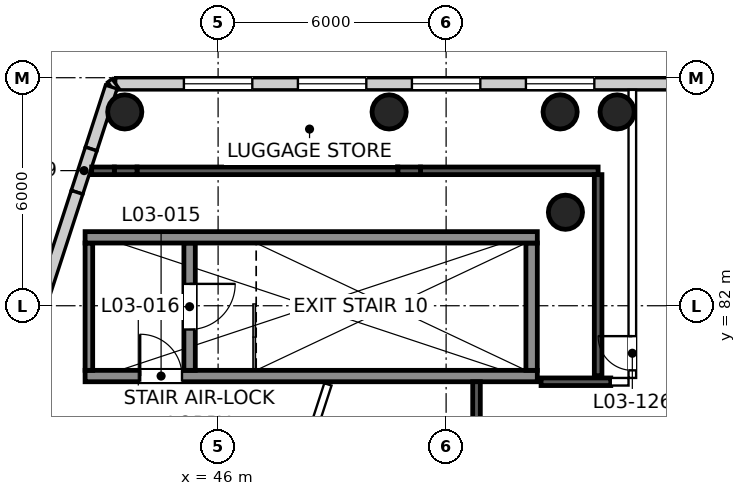
"""IFC4 building model, lengths in metres.
Left out: names, types, materials, properties, quantities, classifications, styles, units other than length and angle.
Written with IfcOpenShell. Run it as: python <this file> out.ifc"""

import sys

from ifc_helpers import new_model, si_unit, direction, frame, frame_2d, origin, origin_2d, place, context, subcontext, project, spatial, rectangle, circle, extrude, element, fill, save


model = new_model("IFC4")
c1 = context("Model", 3, precision=1e-05, world=origin(), true_north=direction((0.0, 1.0)))
c2 = subcontext(c1, "Body", "Model", "MODEL_VIEW")
j1 = project(units=[si_unit("LENGTHUNIT", "METRE"), si_unit("PLANEANGLEUNIT", "RADIAN")], contexts=[c1])
p1 = place(None, origin())
s1 = spatial("IfcSite", under=j1, at=p1, CompositionType="ELEMENT")
p2 = place(p1, origin())
s2 = spatial("IfcBuilding", under=s1, at=p2, CompositionType="ELEMENT")
p3 = place(p2, frame((0.0, 0.0, 23.0)))
s3 = spatial("IfcBuildingStorey", under=s2, at=p3, CompositionType="ELEMENT", Elevation=23.0)
for number, where, z_axis, x_axis in (
    (1, (55.14, 84.46, 0.0), (0.0, 0.0, 1.0), (1.0, 0.0, 0.0)),
    (2, (56.5, 87.1, 0.0), (0.0, 0.0, 1.0), (1.0, 0.0, 0.0)),
    (3, (50.5, 87.1, 0.0), (0.0, 0.0, 1.0), (1.0, 0.0, 0.0)),
    (4, (43.544, 87.1, 0.0), (0.0, 0.0, 1.0), (1.0, 0.0, 0.0)),
    (5, (55.0, 87.1, 0.0), (0.0, 0.0, 1.0), (1.0, 0.0, 0.0)),
):
    element("IfcColumn", number, at=place(p3, frame(where, z_axis=z_axis, x_axis=x_axis)), inside=s3, PredefinedType="COLUMN", context=c2, shape_type="SweptSolid", body=[
        extrude(circle(Radius=0.45, at=origin_2d()), origin(), (0.0, 0.0, 1.0), 6.0),
    ])
p4 = place(p3, frame((59.0, 87.84, 0.0), z_axis=(0.0, 0.0, 1.0), x_axis=(-1.0, 0.0, 0.0)))
e6 = element("IfcWall", 6, at=p4, inside=s3, PredefinedType="SOLIDWALL", context=c2, shape_type="SweptSolid", body=[
    extrude(rectangle(XDim=15.697, YDim=0.32, at=frame_2d((7.848, 0.0))), origin(), (0.0, 0.0, 1.0), 5.65),
])
p5 = place(p4, frame((3.1, 0.0, 0.9)))
e7 = element("IfcOpeningElement", 7, at=p5, cuts=e6, PredefinedType="OPENING", context=c2, shape_type="SweptSolid", body=[
    extrude(rectangle(XDim=1.8, YDim=2.1, at=frame_2d((0.9, 1.05))), frame((0.0, 0.17, 0.0), z_axis=(0.0, -1.0, 0.0), x_axis=(1.0, 0.0, 0.0)), (0.0, 0.0, 1.0), 0.34),
])
p6 = place(p4, frame((6.1, 0.0, 0.9)))
e8 = element("IfcOpeningElement", 8, at=p6, cuts=e6, PredefinedType="OPENING", context=c2, shape_type="SweptSolid", body=[
    extrude(rectangle(XDim=1.8, YDim=2.1, at=frame_2d((0.9, 1.05))), frame((0.0, 0.17, 0.0), z_axis=(0.0, -1.0, 0.0), x_axis=(1.0, 0.0, 0.0)), (0.0, 0.0, 1.0), 0.34),
])
p7 = place(p4, frame((9.1, 0.0, 0.9)))
e9 = element("IfcOpeningElement", 9, at=p7, cuts=e6, PredefinedType="OPENING", context=c2, shape_type="SweptSolid", body=[
    extrude(rectangle(XDim=1.8, YDim=2.1, at=frame_2d((0.9, 1.05))), frame((0.0, 0.17, 0.0), z_axis=(0.0, -1.0, 0.0), x_axis=(1.0, 0.0, 0.0)), (0.0, 0.0, 1.0), 0.34),
])
p8 = place(p4, frame((12.1, 0.0, 0.9)))
e10 = element("IfcOpeningElement", 10, at=p8, cuts=e6, PredefinedType="OPENING", context=c2, shape_type="SweptSolid", body=[
    extrude(rectangle(XDim=1.8, YDim=2.1, at=frame_2d((0.9, 1.05))), frame((0.0, 0.17, 0.0), z_axis=(0.0, -1.0, 0.0), x_axis=(1.0, 0.0, 0.0)), (0.0, 0.0, 1.0), 0.34),
])
p9 = place(p3, frame((43.303, 87.84, 0.0), z_axis=(0.0, 0.0, 1.0), x_axis=(-0.808436541228, -0.588583349074, 0.0)))
e11 = element("IfcWall", 11, at=p9, inside=s3, PredefinedType="SOLIDWALL", context=c2, shape_type="SweptSolid", body=[
    extrude(rectangle(XDim=0.141, YDim=0.32, at=frame_2d((0.071, 0.0))), origin(), (0.0, 0.0, 1.0), 5.65),
])
p10 = place(p3, frame((43.189, 87.757, 0.0), z_axis=(0.0, 0.0, 1.0), x_axis=(-0.309044227737, -0.951047667208, 0.0)))
e12 = element("IfcWall", 12, at=p10, inside=s3, PredefinedType="SOLIDWALL", context=c2, shape_type="SweptSolid", body=[
    extrude(rectangle(XDim=1.715, YDim=0.32, at=frame_2d((0.857, 0.0))), origin(), (0.0, 0.0, 1.0), 5.65),
])
p11 = place(p3, frame((42.659, 86.126, 0.0), z_axis=(0.0, 0.0, 1.0), x_axis=(-0.309017071679, -0.951056491178, 0.0)))
e13 = element("IfcWall", 13, at=p11, inside=s3, PredefinedType="SOLIDWALL", context=c2, shape_type="SweptSolid", body=[
    extrude(rectangle(XDim=1.2, YDim=0.32, at=frame_2d((0.6, 0.0))), origin(), (0.0, 0.0, 1.0), 5.65),
])
p12 = place(p3, frame((42.288, 84.985, 0.0), z_axis=(0.0, 0.0, 1.0), x_axis=(-0.309017988697, -0.95105619322, 0.0)))
e14 = element("IfcWall", 14, at=p12, inside=s3, PredefinedType="SOLIDWALL", context=c2, shape_type="SweptSolid", body=[
    extrude(rectangle(XDim=25.704, YDim=0.32, at=frame_2d((12.852, 0.0))), origin(), (0.0, 0.0, 1.0), 5.65),
])
p13 = place(p12, frame((7.344, 0.0, 0.9)))
e15 = element("IfcOpeningElement", 15, at=p13, cuts=e14, PredefinedType="OPENING", context=c2, shape_type="SweptSolid", body=[
    extrude(rectangle(XDim=2.1, YDim=3.0, at=frame_2d((1.05, 1.5))), frame((0.0, 0.17, 0.0), z_axis=(0.0, -1.0, 0.0), x_axis=(1.0, 0.0, 0.0)), (0.0, 0.0, 1.0), 0.34),
])
p14 = place(p12, frame((10.344, 0.0, 0.9)))
e16 = element("IfcOpeningElement", 16, at=p14, cuts=e14, PredefinedType="OPENING", context=c2, shape_type="SweptSolid", body=[
    extrude(rectangle(XDim=2.1, YDim=3.0, at=frame_2d((1.05, 1.5))), frame((0.0, 0.17, 0.0), z_axis=(0.0, -1.0, 0.0), x_axis=(1.0, 0.0, 0.0)), (0.0, 0.0, 1.0), 0.34),
])
p15 = place(p12, frame((13.344, 0.0, 0.9)))
e17 = element("IfcOpeningElement", 17, at=p15, cuts=e14, PredefinedType="OPENING", context=c2, shape_type="SweptSolid", body=[
    extrude(rectangle(XDim=2.1, YDim=3.0, at=frame_2d((1.05, 1.5))), frame((0.0, 0.17, 0.0), z_axis=(0.0, -1.0, 0.0), x_axis=(1.0, 0.0, 0.0)), (0.0, 0.0, 1.0), 0.34),
])
p16 = place(p12, frame((16.344, 0.0, 0.9)))
e18 = element("IfcOpeningElement", 18, at=p16, cuts=e14, PredefinedType="OPENING", context=c2, shape_type="SweptSolid", body=[
    extrude(rectangle(XDim=2.1, YDim=3.0, at=frame_2d((1.05, 1.5))), frame((0.0, 0.17, 0.0), z_axis=(0.0, -1.0, 0.0), x_axis=(1.0, 0.0, 0.0)), (0.0, 0.0, 1.0), 0.34),
])
p17 = place(p12, frame((19.344, 0.0, 0.9)))
e19 = element("IfcOpeningElement", 19, at=p17, cuts=e14, PredefinedType="OPENING", context=c2, shape_type="SweptSolid", body=[
    extrude(rectangle(XDim=2.1, YDim=3.0, at=frame_2d((1.05, 1.5))), frame((0.0, 0.17, 0.0), z_axis=(0.0, -1.0, 0.0), x_axis=(1.0, 0.0, 0.0)), (0.0, 0.0, 1.0), 0.34),
])
p18 = place(p12, frame((22.344, 0.0, 0.9)))
e20 = element("IfcOpeningElement", 20, at=p18, cuts=e14, PredefinedType="OPENING", context=c2, shape_type="SweptSolid", body=[
    extrude(rectangle(XDim=2.1, YDim=3.0, at=frame_2d((1.05, 1.5))), frame((0.0, 0.17, 0.0), z_axis=(0.0, -1.0, 0.0), x_axis=(1.0, 0.0, 0.0)), (0.0, 0.0, 1.0), 0.34),
])
p19 = place(p3, frame((42.5, 80.15, 0.0), z_axis=(0.0, 0.0, 1.0), x_axis=(1.0, 0.0, 0.0)))
e21 = element("IfcWall", 21, at=p19, inside=s3, PredefinedType="SHEAR", context=c2, shape_type="SweptSolid", body=[
    extrude(rectangle(XDim=11.9, YDim=0.3, at=frame_2d((5.95, 0.0))), origin(), (0.0, 0.0, 1.0), 6.0),
])
p20 = place(p19, frame((1.45, 0.0, 0.0)))
e22 = element("IfcOpeningElement", 22, at=p20, cuts=e21, PredefinedType="OPENING", context=c2, shape_type="SweptSolid", body=[
    extrude(rectangle(XDim=1.1, YDim=2.1, at=frame_2d((0.55, 1.05))), frame((0.0, 0.16, 0.0), z_axis=(0.0, -1.0, 0.0), x_axis=(1.0, 0.0, 0.0)), (0.0, 0.0, 1.0), 0.32),
])
p21 = place(p3, frame((42.6, 80.3, 0.0), z_axis=(0.0, 0.0, 1.0), x_axis=(0.0, 1.0, 0.0)))
e23 = element("IfcWall", 23, at=p21, inside=s3, PredefinedType="SHEAR", context=c2, shape_type="SweptSolid", body=[
    extrude(rectangle(XDim=3.35, YDim=0.2, at=frame_2d((1.675, 0.0))), origin(), (0.0, 0.0, 1.0), 6.0),
])
p22 = place(p3, frame((45.25, 80.3, 0.0), z_axis=(0.0, 0.0, 1.0), x_axis=(0.0, 1.0, 0.0)))
e24 = element("IfcWall", 24, at=p22, inside=s3, PredefinedType="SHEAR", context=c2, shape_type="SweptSolid", body=[
    extrude(rectangle(XDim=3.35, YDim=0.3, at=frame_2d((1.675, 0.0))), origin(), (0.0, 0.0, 1.0), 6.0),
])
p23 = place(p22, frame((1.075, 0.0, 0.0)))
e25 = element("IfcOpeningElement", 25, at=p23, cuts=e24, PredefinedType="OPENING", context=c2, shape_type="SweptSolid", body=[
    extrude(rectangle(XDim=1.2, YDim=2.1, at=frame_2d((0.6, 1.05))), frame((0.0, 0.16, 0.0), z_axis=(0.0, -1.0, 0.0), x_axis=(1.0, 0.0, 0.0)), (0.0, 0.0, 1.0), 0.32),
])
p24 = place(p3, frame((54.25, 80.3, 0.0), z_axis=(0.0, 0.0, 1.0), x_axis=(0.0, 1.0, 0.0)))
e26 = element("IfcWall", 26, at=p24, inside=s3, PredefinedType="SHEAR", context=c2, shape_type="SweptSolid", body=[
    extrude(rectangle(XDim=3.35, YDim=0.3, at=frame_2d((1.675, 0.0))), origin(), (0.0, 0.0, 1.0), 6.0),
])
p25 = place(p3, frame((42.5, 83.8, 0.0), z_axis=(0.0, 0.0, 1.0), x_axis=(1.0, 0.0, 0.0)))
e27 = element("IfcWall", 27, at=p25, inside=s3, PredefinedType="SHEAR", context=c2, shape_type="SweptSolid", body=[
    extrude(rectangle(XDim=11.9, YDim=0.3, at=frame_2d((5.95, 0.0))), origin(), (0.0, 0.0, 1.0), 6.0),
])
p26 = place(p3, frame((42.599, 60.57, 0.0), z_axis=(0.0, 0.0, 1.0), x_axis=(0.309008514197, 0.95105927163, 0.0)))
e28 = element("IfcWall", 28, at=p26, inside=s3, PredefinedType="PARTITIONING", context=c2, shape_type="SweptSolid", body=[
    extrude(rectangle(XDim=20.357, YDim=0.2, at=frame_2d((10.179, 0.0))), origin(), (0.0, 0.0, 1.0), 5.65),
])
p27 = place(p26, frame((17.038, 0.0, 0.0)))
e29 = element("IfcOpeningElement", 29, at=p27, cuts=e28, PredefinedType="OPENING", context=c2, shape_type="SweptSolid", body=[
    extrude(rectangle(XDim=0.9, YDim=2.1, at=frame_2d((0.45, 1.05))), frame((0.0, 0.11, 0.0), z_axis=(0.0, -1.0, 0.0), x_axis=(1.0, 0.0, 0.0)), (0.0, 0.0, 1.0), 0.22),
])
p28 = place(p26, frame((11.279, 0.0, 0.0)))
e30 = element("IfcOpeningElement", 30, at=p28, cuts=e28, PredefinedType="OPENING", context=c2, shape_type="SweptSolid", body=[
    extrude(rectangle(XDim=0.9, YDim=2.1, at=frame_2d((0.45, 1.05))), frame((0.0, 0.11, 0.0), z_axis=(0.0, -1.0, 0.0), x_axis=(1.0, 0.0, 0.0)), (0.0, 0.0, 1.0), 0.22),
])
p29 = place(p26, frame((3.148, 0.0, 0.0)))
e31 = element("IfcOpeningElement", 31, at=p29, cuts=e28, PredefinedType="OPENING", context=c2, shape_type="SweptSolid", body=[
    extrude(rectangle(XDim=0.9, YDim=2.1, at=frame_2d((0.45, 1.05))), frame((0.0, 0.11, 0.0), z_axis=(0.0, -1.0, 0.0), x_axis=(1.0, 0.0, 0.0)), (0.0, 0.0, 1.0), 0.22),
])
p30 = place(p3, frame((54.499, 80.0, 0.0), z_axis=(0.0, 0.0, 1.0), x_axis=(1.0, 0.0, 0.0)))
e32 = element("IfcWall", 32, at=p30, inside=s3, PredefinedType="PARTITIONING", context=c2, shape_type="SweptSolid", body=[
    extrude(rectangle(XDim=1.834, YDim=0.2, at=frame_2d((0.917, 0.0))), origin(), (0.0, 0.0, 1.0), 5.65),
])
p31 = place(p3, frame((56.333, 80.0, 0.0), z_axis=(0.0, 0.0, 1.0), x_axis=(1.0, 0.0, 0.0)))
e33 = element("IfcWall", 33, at=p31, inside=s3, PredefinedType="PARTITIONING", context=c2, shape_type="SweptSolid", body=[
    extrude(rectangle(XDim=0.467, YDim=0.2, at=frame_2d((0.233, 0.0))), origin(), (0.0, 0.0, 1.0), 5.65),
])
p32 = place(p3, frame((56.9, 80.1, 0.0), z_axis=(0.0, 0.0, 1.0), x_axis=(0.0, 1.0, 0.0)))
e34 = element("IfcWall", 34, at=p32, inside=s3, PredefinedType="PARTITIONING", context=c2, shape_type="SweptSolid", body=[
    extrude(rectangle(XDim=7.58, YDim=0.2, at=frame_2d((3.79, 0.0))), origin(), (0.0, 0.0, 1.0), 4.95),
])
p33 = place(p32, frame((0.2, 0.0, 0.0)))
e35 = element("IfcOpeningElement", 35, at=p33, cuts=e34, PredefinedType="OPENING", context=c2, shape_type="SweptSolid", body=[
    extrude(rectangle(XDim=0.9, YDim=2.1, at=frame_2d((0.45, 1.05))), frame((0.0, 0.11, 0.0), z_axis=(0.0, -1.0, 0.0), x_axis=(1.0, 0.0, 0.0)), (0.0, 0.0, 1.0), 0.22),
])
p34 = place(p3, frame((52.8, 64.875, 0.0), z_axis=(0.0, 0.0, 1.0), x_axis=(0.0, 1.0, 0.0)))
e36 = element("IfcWall", 36, at=p34, inside=s3, PredefinedType="PARTITIONING", context=c2, shape_type="SweptSolid", body=[
    extrude(rectangle(XDim=15.125, YDim=0.2, at=frame_2d((7.562, 0.0))), origin(), (0.0, 0.0, 1.0), 5.65),
])
p35 = place(p34, frame((3.637, 0.0, 0.0)))
e37 = element("IfcOpeningElement", 37, at=p35, cuts=e36, PredefinedType="OPENING", context=c2, shape_type="SweptSolid", body=[
    extrude(rectangle(XDim=1.8, YDim=2.1, at=frame_2d((0.9, 1.05))), frame((0.0, 0.11, 0.0), z_axis=(0.0, -1.0, 0.0), x_axis=(1.0, 0.0, 0.0)), (0.0, 0.0, 1.0), 0.22),
])
p36 = place(p34, frame((9.688, 0.0, 0.0)))
e38 = element("IfcOpeningElement", 38, at=p36, cuts=e36, PredefinedType="OPENING", context=c2, shape_type="SweptSolid", body=[
    extrude(rectangle(XDim=1.8, YDim=2.1, at=frame_2d((0.9, 1.05))), frame((0.0, 0.11, 0.0), z_axis=(0.0, -1.0, 0.0), x_axis=(1.0, 0.0, 0.0)), (0.0, 0.0, 1.0), 0.22),
])
p37 = place(p3, frame((56.0, 85.55, 0.0), z_axis=(0.0, 0.0, 1.0), x_axis=(-1.0, 0.0, 0.0)))
e39 = element("IfcWall", 39, at=p37, inside=s3, PredefinedType="PARTITIONING", context=c2, shape_type="SweptSolid", body=[
    extrude(rectangle(XDim=4.674, YDim=0.2, at=frame_2d((2.337, 0.0))), origin(), (0.0, 0.0, 1.0), 5.65),
])
p38 = place(p3, frame((51.326, 85.55, 0.0), z_axis=(0.0, 0.0, 1.0), x_axis=(-1.0, 0.0, 0.0)))
e40 = element("IfcWall", 40, at=p38, inside=s3, PredefinedType="PARTITIONING", context=c2, shape_type="SweptSolid", body=[
    extrude(rectangle(XDim=0.597, YDim=0.2, at=frame_2d((0.298, 0.0))), origin(), (0.0, 0.0, 1.0), 4.95),
])
p39 = place(p3, frame((50.729, 85.55, 0.0), z_axis=(0.0, 0.0, 1.0), x_axis=(-1.0, 0.0, 0.0)))
e41 = element("IfcWall", 41, at=p39, inside=s3, PredefinedType="PARTITIONING", context=c2, shape_type="SweptSolid", body=[
    extrude(rectangle(XDim=6.862, YDim=0.2, at=frame_2d((3.431, 0.0))), origin(), (0.0, 0.0, 1.0), 5.65),
])
p40 = place(p3, frame((43.867, 85.55, 0.0), z_axis=(0.0, 0.0, 1.0), x_axis=(-1.0, 0.0, 0.0)))
e42 = element("IfcWall", 42, at=p40, inside=s3, PredefinedType="PARTITIONING", context=c2, shape_type="SweptSolid", body=[
    extrude(rectangle(XDim=0.597, YDim=0.2, at=frame_2d((0.298, 0.0))), origin(), (0.0, 0.0, 1.0), 4.95),
])
p41 = place(p3, frame((43.27, 85.55, 0.0), z_axis=(0.0, 0.0, 1.0), x_axis=(-1.0, 0.0, 0.0)))
e43 = element("IfcWall", 43, at=p41, inside=s3, PredefinedType="PARTITIONING", context=c2, shape_type="SweptSolid", body=[
    extrude(rectangle(XDim=0.597, YDim=0.2, at=frame_2d((0.298, 0.0))), origin(), (0.0, 0.0, 1.0), 5.65),
])
p42 = place(p3, frame((56.0, 80.16, 0.0), z_axis=(0.0, 0.0, 1.0), x_axis=(0.0, 1.0, 0.0)))
e44 = element("IfcWall", 44, at=p42, inside=s3, PredefinedType="PARTITIONING", context=c2, shape_type="SweptSolid", body=[
    extrude(rectangle(XDim=5.29, YDim=0.2, at=frame_2d((2.645, 0.0))), origin(), (0.0, 0.0, 1.0), 5.65),
])
p43 = place(p5, origin())
e45 = element("IfcWindow", 45, at=p43, inside=s3, PartitioningType="SINGLE_PANEL", PredefinedType="WINDOW", context=c2, shape_type="SweptSolid", body=[
    extrude(rectangle(XDim=1.8, YDim=2.1, at=frame_2d((0.9, 1.05))), frame((0.0, 0.07, 0.0), z_axis=(0.0, -1.0, 0.0), x_axis=(1.0, 0.0, 0.0)), (0.0, 0.0, 1.0), 0.06),
])
fill(e7, e45)
p44 = place(p6, origin())
e46 = element("IfcWindow", 46, at=p44, inside=s3, PartitioningType="SINGLE_PANEL", PredefinedType="WINDOW", context=c2, shape_type="SweptSolid", body=[
    extrude(rectangle(XDim=1.8, YDim=2.1, at=frame_2d((0.9, 1.05))), frame((0.0, 0.07, 0.0), z_axis=(0.0, -1.0, 0.0), x_axis=(1.0, 0.0, 0.0)), (0.0, 0.0, 1.0), 0.06),
])
fill(e8, e46)
p45 = place(p7, origin())
e47 = element("IfcWindow", 47, at=p45, inside=s3, PartitioningType="SINGLE_PANEL", PredefinedType="WINDOW", context=c2, shape_type="SweptSolid", body=[
    extrude(rectangle(XDim=1.8, YDim=2.1, at=frame_2d((0.9, 1.05))), frame((0.0, 0.07, 0.0), z_axis=(0.0, -1.0, 0.0), x_axis=(1.0, 0.0, 0.0)), (0.0, 0.0, 1.0), 0.06),
])
fill(e9, e47)
p46 = place(p8, origin())
e48 = element("IfcWindow", 48, at=p46, inside=s3, PartitioningType="SINGLE_PANEL", PredefinedType="WINDOW", context=c2, shape_type="SweptSolid", body=[
    extrude(rectangle(XDim=1.8, YDim=2.1, at=frame_2d((0.9, 1.05))), frame((0.0, 0.07, 0.0), z_axis=(0.0, -1.0, 0.0), x_axis=(1.0, 0.0, 0.0)), (0.0, 0.0, 1.0), 0.06),
])
fill(e10, e48)
p47 = place(p20, origin())
e49 = element("IfcDoor", 49, at=p47, inside=s3, OperationType="SINGLE_SWING_LEFT", PredefinedType="DOOR", context=c2, shape_type="SweptSolid", body=[
    extrude(rectangle(XDim=1.1, YDim=2.1, at=frame_2d((0.55, 1.05))), frame((0.0, 0.025, 0.0), z_axis=(0.0, -1.0, 0.0), x_axis=(1.0, 0.0, 0.0)), (0.0, 0.0, 1.0), 0.05),
])
fill(e22, e49)
p48 = place(p23, frame((1.2, 0.0, 0.0), z_axis=(0.0, 0.0, 1.0), x_axis=(-1.0, 0.0, 0.0)))
e50 = element("IfcDoor", 50, at=p48, inside=s3, OperationType="SINGLE_SWING_LEFT", PredefinedType="DOOR", context=c2, shape_type="SweptSolid", body=[
    extrude(rectangle(XDim=1.2, YDim=2.1, at=frame_2d((0.6, 1.05))), frame((0.0, 0.025, 0.0), z_axis=(0.0, -1.0, 0.0), x_axis=(1.0, 0.0, 0.0)), (0.0, 0.0, 1.0), 0.05),
])
fill(e25, e50)
p49 = place(p33, origin())
e51 = element("IfcDoor", 51, at=p49, inside=s3, OperationType="SINGLE_SWING_RIGHT", PredefinedType="DOOR", context=c2, shape_type="SweptSolid", body=[
    extrude(rectangle(XDim=0.9, YDim=2.1, at=frame_2d((0.45, 1.05))), frame((0.0, 0.025, 0.0), z_axis=(0.0, -1.0, 0.0), x_axis=(1.0, 0.0, 0.0)), (0.0, 0.0, 1.0), 0.05),
])
fill(e35, e51)
save(model, sys.argv[1])
